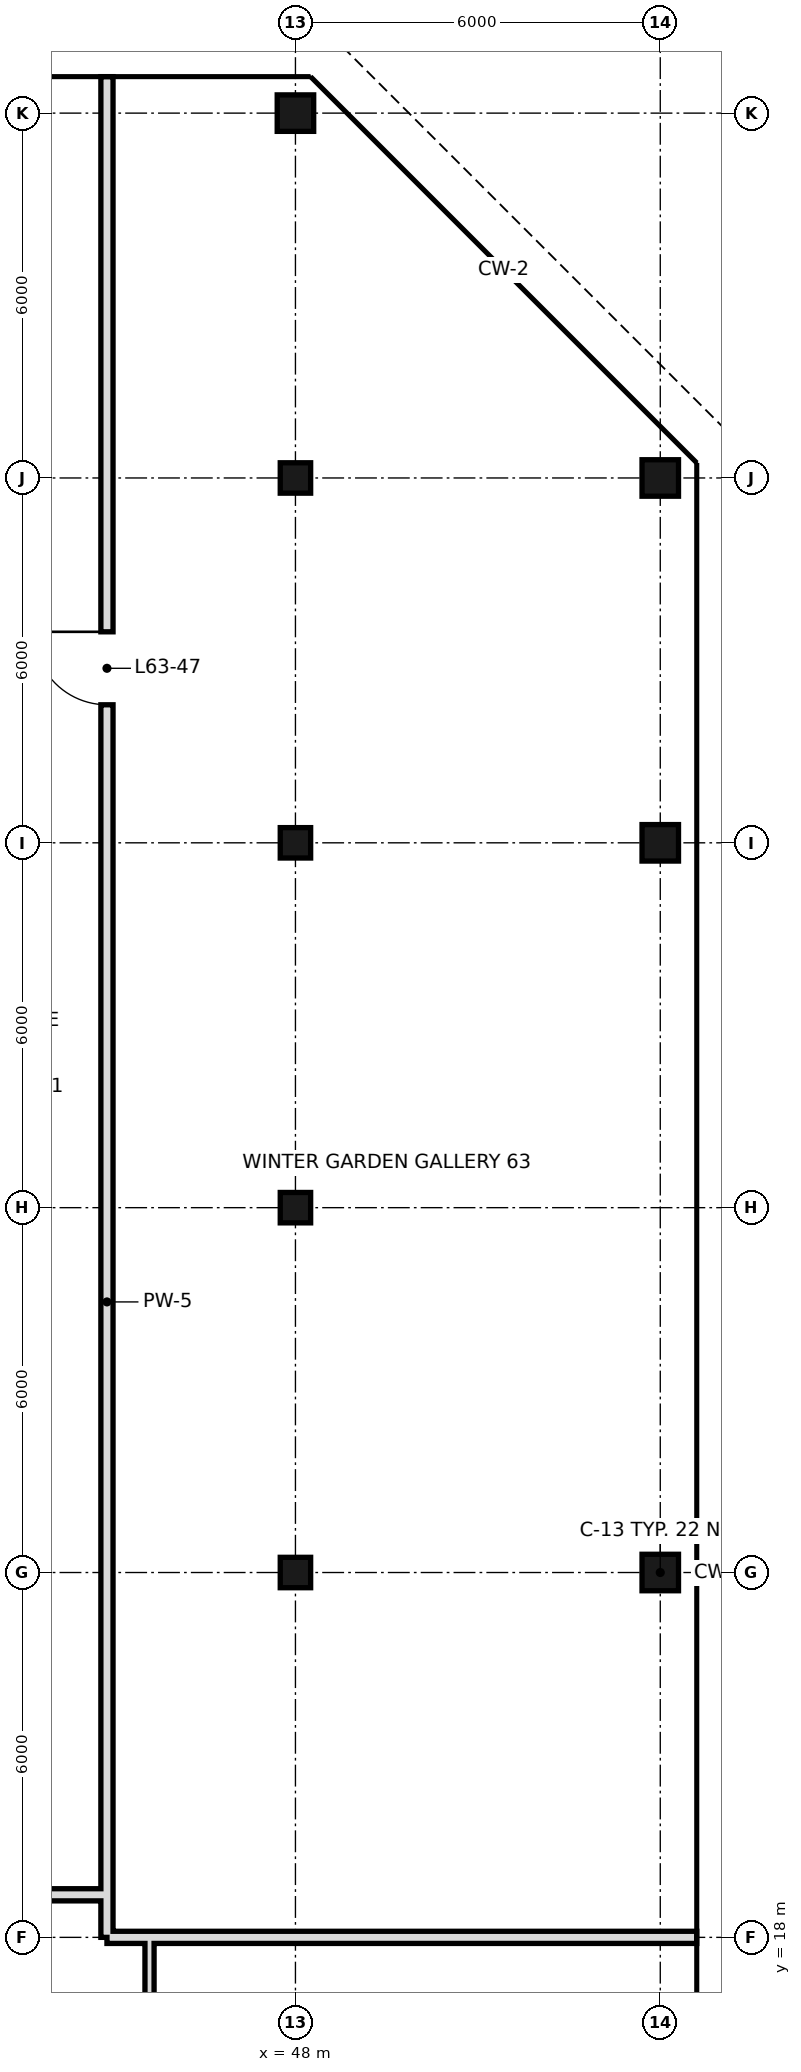
"""IFC4 building model, lengths in metres.
Left out: names, types, materials, properties, quantities, classifications, styles, units other than length and angle.
Written with IfcOpenShell. Run it as: python <this file> out.ifc"""

import sys

from ifc_helpers import new_model, si_unit, direction, frame, frame_2d, origin, origin_2d, place, context, subcontext, project, spatial, rectangle, hollow_rectangle, extrude, element, fill, save


model = new_model("IFC4")
c1 = context("Model", 3, precision=1e-05, world=origin(), true_north=direction((0.0, 1.0)))
c2 = subcontext(c1, "Body", "Model", "MODEL_VIEW")
j1 = project(units=[si_unit("LENGTHUNIT", "METRE"), si_unit("PLANEANGLEUNIT", "RADIAN")], contexts=[c1])
p1 = place(None, origin())
s1 = spatial("IfcSite", under=j1, at=p1, CompositionType="ELEMENT")
p2 = place(p1, origin())
s2 = spatial("IfcBuilding", under=s1, at=p2, CompositionType="ELEMENT")
p3 = place(p2, frame((0.0, 0.0, 266.6)))
s3 = spatial("IfcBuildingStorey", under=s2, at=p3, CompositionType="ELEMENT", Elevation=266.6)
for number, where, z_axis, x_axis in (
    (1, (48.0, 24.0, 0.0), (0.0, 0.0, 1.0), (1.0, 0.0, 0.0)),
    (2, (48.0, 30.0, 0.0), (0.0, 0.0, 1.0), (1.0, 0.0, 0.0)),
    (3, (48.0, 36.0, 0.0), (0.0, 0.0, 1.0), (1.0, 0.0, 0.0)),
    (4, (48.0, 42.0, 0.0), (0.0, 0.0, 1.0), (1.0, 0.0, 0.0)),
):
    element("IfcColumn", number, at=place(p3, frame(where, z_axis=z_axis, x_axis=x_axis)), inside=s3, PredefinedType="COLUMN", context=c2, shape_type="SweptSolid", body=[
        extrude(hollow_rectangle(XDim=0.5, YDim=0.5, WallThickness=0.025, at=origin_2d()), origin(), (0.0, 0.0, 1.0), 3.6),
    ])
for number, where, z_axis, x_axis in (
    (5, (48.0, 48.0, 0.0), (0.0, 0.0, 1.0), (1.0, 0.0, 0.0)),
    (6, (54.0, 24.0, 0.0), (0.0, 0.0, 1.0), (1.0, 0.0, 0.0)),
    (7, (54.0, 36.0, 0.0), (0.0, 0.0, 1.0), (1.0, 0.0, 0.0)),
    (8, (54.0, 42.0, 0.0), (0.0, 0.0, 1.0), (1.0, 0.0, 0.0)),
):
    element("IfcColumn", number, at=place(p3, frame(where, z_axis=z_axis, x_axis=x_axis)), inside=s3, PredefinedType="COLUMN", context=c2, shape_type="SweptSolid", body=[
        extrude(hollow_rectangle(XDim=0.6, YDim=0.6, WallThickness=0.028, at=origin_2d()), origin(), (0.0, 0.0, 1.0), 3.6),
    ])
p4 = place(p3, frame((44.9, 18.0, 0.0), z_axis=(0.0, 0.0, 1.0), x_axis=(0.0, 1.0, 0.0)))
e9 = element("IfcWall", 9, at=p4, inside=s3, PredefinedType="SOLIDWALL", context=c2, shape_type="SweptSolid", body=[
    extrude(rectangle(XDim=30.6, YDim=0.2, at=frame_2d((15.3, 0.0))), origin(), (0.0, 0.0, 1.0), 2.72),
])
p5 = place(p4, frame((20.27, 0.0, 0.0)))
e10 = element("IfcOpeningElement", 10, at=p5, cuts=e9, PredefinedType="OPENING", context=c2, shape_type="SweptSolid", body=[
    extrude(rectangle(XDim=1.2, YDim=2.4, at=frame_2d((0.6, 1.2))), frame((0.0, 0.11, 0.0), z_axis=(0.0, -1.0, 0.0), x_axis=(1.0, 0.0, 0.0)), (0.0, 0.0, 1.0), 0.22),
])
p6 = place(p3, frame((45.6, 10.8, 0.0), z_axis=(0.0, 0.0, 1.0), x_axis=(0.0, 1.0, 0.0)))
e11 = element("IfcWall", 11, at=p6, inside=s3, PredefinedType="PARTITIONING", context=c2, shape_type="SweptSolid", body=[
    extrude(rectangle(XDim=7.2, YDim=0.15, at=frame_2d((3.6, 0.0))), origin(), (0.0, 0.0, 1.0), 3.42),
])
p7 = place(p3, frame((44.9, 18.0, 0.0), z_axis=(0.0, 0.0, 1.0), x_axis=(1.0, 0.0, 0.0)))
e12 = element("IfcWall", 12, at=p7, inside=s3, PredefinedType="SOLIDWALL", context=c2, shape_type="SweptSolid", body=[
    extrude(rectangle(XDim=9.7, YDim=0.2, at=frame_2d((4.85, 0.0))), origin(), (0.0, 0.0, 1.0), 2.72),
])
p8 = place(p3, frame((27.6, 18.7, 0.0), z_axis=(0.0, 0.0, 1.0), x_axis=(1.0, 0.0, 0.0)))
e13 = element("IfcWall", 13, at=p8, inside=s3, PredefinedType="SOLIDWALL", context=c2, shape_type="SweptSolid", body=[
    extrude(rectangle(XDim=17.3, YDim=0.2, at=frame_2d((8.65, 0.0))), origin(), (0.0, 0.0, 1.0), 2.72),
])
p9 = place(p8, frame((1.54, 0.0, 0.0)))
e14 = element("IfcOpeningElement", 14, at=p9, cuts=e13, PredefinedType="OPENING", context=c2, shape_type="SweptSolid", body=[
    extrude(rectangle(XDim=1.2, YDim=2.4, at=frame_2d((0.6, 1.2))), frame((0.0, 0.11, 0.0), z_axis=(0.0, -1.0, 0.0), x_axis=(1.0, 0.0, 0.0)), (0.0, 0.0, 1.0), 0.22),
])
p10 = place(p5, frame((1.2, 0.0, 0.0), z_axis=(0.0, 0.0, 1.0), x_axis=(-1.0, 0.0, 0.0)))
e15 = element("IfcDoor", 15, at=p10, inside=s3, OperationType="SINGLE_SWING_LEFT", PredefinedType="DOOR", context=c2, shape_type="SweptSolid", body=[
    extrude(rectangle(XDim=1.2, YDim=2.4, at=frame_2d((0.6, 1.2))), frame((0.0, 0.025, 0.0), z_axis=(0.0, -1.0, 0.0), x_axis=(1.0, 0.0, 0.0)), (0.0, 0.0, 1.0), 0.05),
])
fill(e10, e15)
save(model, sys.argv[1])
